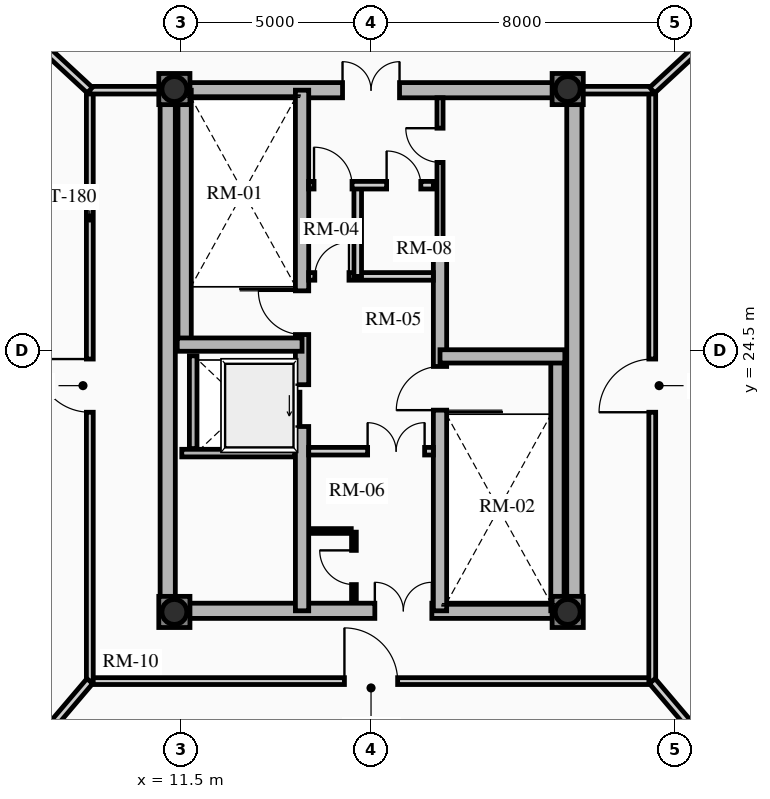
"""IFC4 building model, lengths in metres.
Left out: names, types, materials, properties, quantities, classifications, styles, units other than length and angle.
Written with IfcOpenShell. Run it as: python <this file> out.ifc"""

import sys

from ifc_helpers import new_model, si_unit, direction, frame, frame_2d, origin, origin_2d, place, context, subcontext, project, spatial, rectangle, hollow_circle, extrude, source, transform, mapped, element, fill, save


model = new_model("IFC4")
c1 = context("Model", 3, precision=1e-05, world=origin(), true_north=direction((0.0, 1.0)))
c2 = subcontext(c1, "Body", "Model", "MODEL_VIEW")
j1 = project(units=[si_unit("LENGTHUNIT", "METRE"), si_unit("PLANEANGLEUNIT", "RADIAN")], contexts=[c1])
p1 = place(None, origin())
s1 = spatial("IfcSite", under=j1, at=p1, CompositionType="ELEMENT")
p2 = place(p1, origin())
s2 = spatial("IfcBuilding", under=s1, at=p2, CompositionType="ELEMENT")
p3 = place(p2, frame((0.0, 0.0, 240.33)))
s3 = spatial("IfcBuildingStorey", under=s2, at=p3, CompositionType="ELEMENT", Elevation=240.33)
for number, where, z_axis, x_axis in (
    (1, (11.15, 17.45, 0.0), (0.0, 0.0, 1.0), (0.0, 1.0, 0.0)),
    (2, (21.85, 17.45, 0.0), (0.0, 0.0, 1.0), (0.0, 1.0, 0.0)),
):
    element("IfcWall", number, at=place(p3, frame(where, z_axis=z_axis, x_axis=x_axis)), inside=s3, PredefinedType="SHEAR", context=c2, shape_type="SweptSolid", body=[
        extrude(rectangle(XDim=14.1, YDim=0.4, at=frame_2d((7.05, 0.0))), origin(), (0.0, 0.0, 1.0), 4.5),
    ])
p4 = place(p3, frame((11.15, 17.65, 0.0), z_axis=(0.0, 0.0, 1.0), x_axis=(1.0, 0.0, 0.0)))
e3 = element("IfcWall", 3, at=p4, inside=s3, PredefinedType="SHEAR", context=c2, shape_type="SweptSolid", body=[
    extrude(rectangle(XDim=10.7, YDim=0.4, at=frame_2d((5.35, 0.0))), origin(), (0.0, 0.0, 1.0), 4.5),
])
m1 = source(origin(), c2, "Body", "SweptSolid", [
    extrude(rectangle(XDim=1.5, YDim=2.02, at=frame_2d((0.75, 1.01))), frame((0.0, 0.21, 0.0), z_axis=(0.0, -1.0, 0.0), x_axis=(1.0, 0.0, 0.0)), (0.0, 0.0, 1.0), 0.42),
])
p5 = place(p4, frame((5.45, 0.0, 0.0)))
e4 = element("IfcOpeningElement", 4, at=p5, cuts=e3, PredefinedType="OPENING", context=c2, shape_type="MappedRepresentation", body=[
    mapped(m1, transform((0.0, 0.0, 0.0), x_axis=(1.0, 0.0, 0.0), y_axis=(0.0, 1.0, 0.0), z_axis=(0.0, 0.0, 1.0), scale=1.0)),
])
p6 = place(p3, frame((11.15, 31.35, 0.0), z_axis=(0.0, 0.0, 1.0), x_axis=(1.0, 0.0, 0.0)))
e5 = element("IfcWall", 5, at=p6, inside=s3, PredefinedType="SHEAR", context=c2, shape_type="SweptSolid", body=[
    extrude(rectangle(XDim=10.7, YDim=0.4, at=frame_2d((5.35, 0.0))), origin(), (0.0, 0.0, 1.0), 4.5),
])
p7 = place(p6, frame((4.6, 0.0, 0.0)))
e6 = element("IfcOpeningElement", 6, at=p7, cuts=e5, PredefinedType="OPENING", context=c2, shape_type="MappedRepresentation", body=[
    mapped(m1, transform((0.0, 0.0, 0.0), x_axis=(1.0, 0.0, 0.0), y_axis=(0.0, 1.0, 0.0), z_axis=(0.0, 0.0, 1.0), scale=1.0)),
])
p8 = place(p3, frame((14.685, 17.65, 0.0), z_axis=(0.0, 0.0, 1.0), x_axis=(0.0, 1.0, 0.0)))
e7 = element("IfcWall", 7, at=p8, inside=s3, PredefinedType="SHEAR", context=c2, shape_type="SweptSolid", body=[
    extrude(rectangle(XDim=13.7, YDim=0.35, at=frame_2d((6.85, 0.0))), origin(), (0.0, 0.0, 1.0), 4.5),
])
m2 = source(origin(), c2, "Body", "SweptSolid", [
    extrude(rectangle(XDim=1.1, YDim=2.015, at=frame_2d((0.55, 1.007))), frame((0.0, 0.185, 0.0), z_axis=(0.0, -1.0, 0.0), x_axis=(1.0, 0.0, 0.0)), (0.0, 0.0, 1.0), 0.37),
])
p9 = place(p8, frame((4.85, 0.0, 0.0)))
e8 = element("IfcOpeningElement", 8, at=p9, cuts=e7, PredefinedType="OPENING", context=c2, shape_type="MappedRepresentation", body=[
    mapped(m2, transform((0.0, 0.0, 0.0), x_axis=(1.0, 0.0, 0.0), y_axis=(0.0, 1.0, 0.0), z_axis=(0.0, 0.0, 1.0), scale=1.0)),
])
m3 = source(origin(), c2, "Body", "SweptSolid", [
    extrude(rectangle(XDim=1.15, YDim=2.02, at=frame_2d((0.575, 1.01))), frame((0.0, 0.185, 0.0), z_axis=(0.0, -1.0, 0.0), x_axis=(1.0, 0.0, 0.0)), (0.0, 0.0, 1.0), 0.37),
])
p10 = place(p8, frame((7.27, 0.0, 0.0)))
e9 = element("IfcOpeningElement", 9, at=p10, cuts=e7, PredefinedType="OPENING", context=c2, shape_type="MappedRepresentation", body=[
    mapped(m3, transform((0.0, 0.0, 0.0), x_axis=(1.0, 0.0, 0.0), y_axis=(0.0, 1.0, 0.0), z_axis=(0.0, 0.0, 1.0), scale=1.0)),
])
p11 = place(p3, frame((18.315, 17.65, 0.0), z_axis=(0.0, 0.0, 1.0), x_axis=(0.0, 1.0, 0.0)))
e10 = element("IfcWall", 10, at=p11, inside=s3, PredefinedType="SHEAR", context=c2, shape_type="SweptSolid", body=[
    extrude(rectangle(XDim=9.6, YDim=0.35, at=frame_2d((4.8, 0.0))), origin(), (0.0, 0.0, 1.0), 4.5),
])
p12 = place(p11, frame((5.28, 0.0, 0.0)))
e11 = element("IfcOpeningElement", 11, at=p12, cuts=e10, PredefinedType="OPENING", context=c2, shape_type="MappedRepresentation", body=[
    mapped(m3, transform((0.0, 0.0, 0.0), x_axis=(1.0, 0.0, 0.0), y_axis=(0.0, 1.0, 0.0), z_axis=(0.0, 0.0, 1.0), scale=1.0)),
])
p13 = place(p3, frame((11.595, 24.655, 0.0), z_axis=(0.0, 0.0, 1.0), x_axis=(0.0, 1.0, 0.0)))
e12 = element("IfcWall", 12, at=p13, inside=s3, PredefinedType="SHEAR", context=c2, shape_type="SweptSolid", body=[
    extrude(rectangle(XDim=6.695, YDim=0.35, at=frame_2d((3.348, 0.0))), origin(), (0.0, 0.0, 1.0), 4.5),
])
p14 = place(p3, frame((11.4, 24.655, 0.0), z_axis=(0.0, 0.0, 1.0), x_axis=(1.0, 0.0, 0.0)))
e13 = element("IfcWall", 13, at=p14, inside=s3, PredefinedType="SHEAR", context=c2, shape_type="SweptSolid", body=[
    extrude(rectangle(XDim=3.285, YDim=0.35, at=frame_2d((1.643, 0.0))), origin(), (0.0, 0.0, 1.0), 4.5),
])
p15 = place(p3, frame((21.405, 17.65, 0.0), z_axis=(0.0, 0.0, 1.0), x_axis=(0.0, 1.0, 0.0)))
e14 = element("IfcWall", 14, at=p15, inside=s3, PredefinedType="SHEAR", context=c2, shape_type="SweptSolid", body=[
    extrude(rectangle(XDim=6.695, YDim=0.35, at=frame_2d((3.348, 0.0))), origin(), (0.0, 0.0, 1.0), 4.5),
])
p16 = place(p3, frame((18.315, 24.345, 0.0), z_axis=(0.0, 0.0, 1.0), x_axis=(1.0, 0.0, 0.0)))
e15 = element("IfcWall", 15, at=p16, inside=s3, PredefinedType="SHEAR", context=c2, shape_type="SweptSolid", body=[
    extrude(rectangle(XDim=3.285, YDim=0.35, at=frame_2d((1.643, 0.0))), origin(), (0.0, 0.0, 1.0), 4.5),
])
for number, where, z_axis, x_axis in (
    (16, (11.325, 17.62, 0.0), (0.0, 0.0, 1.0), (1.0, 0.0, 0.0)),
    (17, (11.325, 31.38, 0.0), (0.0, 0.0, 1.0), (1.0, 0.0, 0.0)),
    (18, (21.675, 17.62, 0.0), (0.0, 0.0, 1.0), (1.0, 0.0, 0.0)),
    (19, (21.675, 31.38, 0.0), (0.0, 0.0, 1.0), (1.0, 0.0, 0.0)),
):
    element("IfcColumn", number, at=place(p3, frame(where, z_axis=z_axis, x_axis=x_axis)), inside=s3, PredefinedType="COLUMN", context=c2, shape_type="SweptSolid", body=[
        extrude(hollow_circle(Radius=0.33, WallThickness=0.025, at=origin_2d()), origin(), (0.0, 0.0, 1.0), 4.5),
    ])
p17 = place(p3, frame((26.718, 15.407, 0.0), z_axis=(0.0, 0.0, 1.0), x_axis=(-0.632467166636, -0.774587169483, 0.0)))
e20 = element("IfcWall", 20, at=p17, inside=s3, PredefinedType="SOLIDWALL", context=c2, shape_type="SweptSolid", body=[
    extrude(rectangle(XDim=4.418, YDim=0.22, at=frame_2d((2.209, 0.0))), origin(), (0.0, 0.0, 1.0), 3.556),
])
p18 = place(p3, frame((11.52, 21.8, 0.0), z_axis=(0.0, 0.0, 1.0), x_axis=(1.0, 0.0, 0.0)))
e21 = element("IfcWall", 21, at=p18, inside=s3, PredefinedType="SHEAR", context=c2, shape_type="SweptSolid", body=[
    extrude(rectangle(XDim=2.97, YDim=0.2, at=frame_2d((1.485, 0.0))), origin(), (0.0, 0.0, 1.0), 4.5),
])
p19 = place(p3, frame((11.82, 21.92, 0.0), z_axis=(0.0, 0.0, 1.0), x_axis=(0.0, 1.0, 0.0)))
e22 = element("IfcWall", 22, at=p19, inside=s3, PredefinedType="SHEAR", context=c2, shape_type="SweptSolid", body=[
    extrude(rectangle(XDim=2.44, YDim=0.2, at=frame_2d((1.22, 0.0))), origin(), (0.0, 0.0, 1.0), 4.5),
])
p20 = place(p3, frame((14.86, 21.85, 0.0), z_axis=(0.0, 0.0, 1.0), x_axis=(1.0, 0.0, 0.0)))
e23 = element("IfcWall", 23, at=p20, inside=s3, PredefinedType="PARTITIONING", context=c2, shape_type="SweptSolid", body=[
    extrude(rectangle(XDim=3.28, YDim=0.2, at=frame_2d((1.64, 0.0))), origin(), (0.0, 0.0, 1.0), 4.185),
])
m4 = source(origin(), c2, "Body", "SweptSolid", [
    extrude(rectangle(XDim=1.5, YDim=2.02, at=frame_2d((0.75, 1.01))), frame((0.0, 0.11, 0.0), z_axis=(0.0, -1.0, 0.0), x_axis=(1.0, 0.0, 0.0)), (0.0, 0.0, 1.0), 0.22),
])
p21 = place(p20, frame((1.55, 0.0, 0.0)))
e24 = element("IfcOpeningElement", 24, at=p21, cuts=e23, PredefinedType="OPENING", context=c2, shape_type="MappedRepresentation", body=[
    mapped(m4, transform((0.0, 0.0, 0.0), x_axis=(1.0, 0.0, 0.0), y_axis=(0.0, 1.0, 0.0), z_axis=(0.0, 0.0, 1.0), scale=1.0)),
])
p22 = place(p3, frame((14.86, 26.45, 0.0), z_axis=(0.0, 0.0, 1.0), x_axis=(1.0, 0.0, 0.0)))
e25 = element("IfcWall", 25, at=p22, inside=s3, PredefinedType="PARTITIONING", context=c2, shape_type="SweptSolid", body=[
    extrude(rectangle(XDim=3.28, YDim=0.2, at=frame_2d((1.64, 0.0))), origin(), (0.0, 0.0, 1.0), 4.185),
])
m5 = source(origin(), c2, "Body", "SweptSolid", [
    extrude(rectangle(XDim=0.9, YDim=2.005, at=frame_2d((0.45, 1.002))), frame((0.0, 0.11, 0.0), z_axis=(0.0, -1.0, 0.0), x_axis=(1.0, 0.0, 0.0)), (0.0, 0.0, 1.0), 0.22),
])
p23 = place(p22, frame((0.16, 0.0, 0.0)))
e26 = element("IfcOpeningElement", 26, at=p23, cuts=e25, PredefinedType="OPENING", context=c2, shape_type="MappedRepresentation", body=[
    mapped(m5, transform((0.0, 0.0, 0.0), x_axis=(1.0, 0.0, 0.0), y_axis=(0.0, 1.0, 0.0), z_axis=(0.0, 0.0, 1.0), scale=1.0)),
])
p24 = place(p3, frame((16.15, 26.45, 0.0), z_axis=(0.0, 0.0, 1.0), x_axis=(0.0, 1.0, 0.0)))
e27 = element("IfcWall", 27, at=p24, inside=s3, PredefinedType="PARTITIONING", context=c2, shape_type="SweptSolid", body=[
    extrude(rectangle(XDim=2.4, YDim=0.2, at=frame_2d((1.2, 0.0))), origin(), (0.0, 0.0, 1.0), 4.185),
])
p25 = place(p3, frame((14.86, 28.85, 0.0), z_axis=(0.0, 0.0, 1.0), x_axis=(1.0, 0.0, 0.0)))
e28 = element("IfcWall", 28, at=p25, inside=s3, PredefinedType="PARTITIONING", context=c2, shape_type="SweptSolid", body=[
    extrude(rectangle(XDim=3.28, YDim=0.2, at=frame_2d((1.64, 0.0))), origin(), (0.0, 0.0, 1.0), 4.185),
])
m6 = source(origin(), c2, "Body", "SweptSolid", [
    extrude(rectangle(XDim=1.0, YDim=2.015, at=frame_2d((0.5, 1.007))), frame((0.0, 0.11, 0.0), z_axis=(0.0, -1.0, 0.0), x_axis=(1.0, 0.0, 0.0)), (0.0, 0.0, 1.0), 0.22),
])
p26 = place(p25, frame((0.14, 0.0, 0.0)))
e29 = element("IfcOpeningElement", 29, at=p26, cuts=e28, PredefinedType="OPENING", context=c2, shape_type="MappedRepresentation", body=[
    mapped(m6, transform((0.0, 0.0, 0.0), x_axis=(1.0, 0.0, 0.0), y_axis=(0.0, 1.0, 0.0), z_axis=(0.0, 0.0, 1.0), scale=1.0)),
])
p27 = place(p25, frame((2.05, 0.0, 0.0)))
e30 = element("IfcOpeningElement", 30, at=p27, cuts=e28, PredefinedType="OPENING", context=c2, shape_type="MappedRepresentation", body=[
    mapped(m5, transform((0.0, 0.0, 0.0), x_axis=(1.0, 0.0, 0.0), y_axis=(0.0, 1.0, 0.0), z_axis=(0.0, 0.0, 1.0), scale=1.0)),
])
p28 = place(p3, frame((16.05, 17.92, 0.0), z_axis=(0.0, 0.0, 1.0), x_axis=(0.0, 1.0, 0.0)))
e31 = element("IfcWall", 31, at=p28, inside=s3, PredefinedType="PARTITIONING", context=c2, shape_type="SweptSolid", body=[
    extrude(rectangle(XDim=1.8, YDim=0.125, at=frame_2d((0.9, 0.0))), origin(), (0.0, 0.0, 1.0), 4.185),
])
m7 = source(origin(), c2, "Body", "SweptSolid", [
    extrude(rectangle(XDim=0.9, YDim=2.005, at=frame_2d((0.45, 1.002))), frame((0.0, 0.073, 0.0), z_axis=(0.0, -1.0, 0.0), x_axis=(1.0, 0.0, 0.0)), (0.0, 0.0, 1.0), 0.145),
])
p29 = place(p28, frame((0.42, 0.0, 0.0)))
e32 = element("IfcOpeningElement", 32, at=p29, cuts=e31, PredefinedType="OPENING", context=c2, shape_type="MappedRepresentation", body=[
    mapped(m7, transform((0.0, 0.0, 0.0), x_axis=(1.0, 0.0, 0.0), y_axis=(0.0, 1.0, 0.0), z_axis=(0.0, 0.0, 1.0), scale=1.0)),
])
p30 = place(p3, frame((14.88, 19.75, 0.0), z_axis=(0.0, 0.0, 1.0), x_axis=(1.0, 0.0, 0.0)))
e33 = element("IfcWall", 33, at=p30, inside=s3, PredefinedType="PARTITIONING", context=c2, shape_type="SweptSolid", body=[
    extrude(rectangle(XDim=1.1, YDim=0.125, at=frame_2d((0.55, 0.0))), origin(), (0.0, 0.0, 1.0), 4.185),
])
p31 = place(p3, frame((18.315, 27.25, 0.0), z_axis=(0.0, 0.0, 1.0), x_axis=(0.0, 1.0, 0.0)))
e34 = element("IfcWall", 34, at=p31, inside=s3, PredefinedType="PARTITIONING", context=c2, shape_type="SweptSolid", body=[
    extrude(rectangle(XDim=3.9, YDim=0.16, at=frame_2d((1.95, 0.0))), origin(), (0.0, 0.0, 1.0), 4.185),
])
m8 = source(origin(), c2, "Body", "SweptSolid", [
    extrude(rectangle(XDim=0.9, YDim=2.005, at=frame_2d((0.45, 1.002))), frame((0.0, 0.09, 0.0), z_axis=(0.0, -1.0, 0.0), x_axis=(1.0, 0.0, 0.0)), (0.0, 0.0, 1.0), 0.18),
])
p32 = place(p31, frame((2.2, 0.0, 0.0)))
e35 = element("IfcOpeningElement", 35, at=p32, cuts=e34, PredefinedType="OPENING", context=c2, shape_type="MappedRepresentation", body=[
    mapped(m8, transform((0.0, 0.0, 0.0), x_axis=(1.0, 0.0, 0.0), y_axis=(0.0, 1.0, 0.0), z_axis=(0.0, 0.0, 1.0), scale=1.0)),
])
p33 = place(p3, frame((9.1, 15.8, 0.0), z_axis=(0.0, 0.0, 1.0), x_axis=(1.0, 0.0, 0.0)))
e36 = element("IfcWall", 36, at=p33, inside=s3, PredefinedType="PARTITIONING", context=c2, shape_type="SweptSolid", body=[
    extrude(rectangle(XDim=14.8, YDim=0.18, at=frame_2d((7.4, 0.0))), origin(), (0.0, 0.0, 1.0), 3.476),
])
m9 = source(origin(), c2, "Body", "SweptSolid", [
    extrude(rectangle(XDim=1.4, YDim=2.02, at=frame_2d((0.7, 1.01))), frame((0.0, 0.1, 0.0), z_axis=(0.0, -1.0, 0.0), x_axis=(1.0, 0.0, 0.0)), (0.0, 0.0, 1.0), 0.2),
])
p34 = place(p33, frame((6.7, 0.0, 0.0)))
e37 = element("IfcOpeningElement", 37, at=p34, cuts=e36, PredefinedType="OPENING", context=c2, shape_type="MappedRepresentation", body=[
    mapped(m9, transform((0.0, 0.0, 0.0), x_axis=(1.0, 0.0, 0.0), y_axis=(0.0, 1.0, 0.0), z_axis=(0.0, 0.0, 1.0), scale=1.0)),
])
p35 = place(p3, frame((9.1, 15.8, 0.0), z_axis=(0.0, 0.0, 1.0), x_axis=(0.0, 1.0, 0.0)))
e38 = element("IfcWall", 38, at=p35, inside=s3, PredefinedType="PARTITIONING", context=c2, shape_type="SweptSolid", body=[
    extrude(rectangle(XDim=15.55, YDim=0.18, at=frame_2d((7.775, 0.0))), origin(), (0.0, 0.0, 1.0), 3.476),
])
p36 = place(p35, frame((7.075, 0.0, 0.0)))
e39 = element("IfcOpeningElement", 39, at=p36, cuts=e38, PredefinedType="OPENING", context=c2, shape_type="MappedRepresentation", body=[
    mapped(m9, transform((0.0, 0.0, 0.0), x_axis=(1.0, 0.0, 0.0), y_axis=(0.0, 1.0, 0.0), z_axis=(0.0, 0.0, 1.0), scale=1.0)),
])
p37 = place(p3, frame((23.9, 15.8, 0.0), z_axis=(0.0, 0.0, 1.0), x_axis=(0.0, 1.0, 0.0)))
e40 = element("IfcWall", 40, at=p37, inside=s3, PredefinedType="PARTITIONING", context=c2, shape_type="SweptSolid", body=[
    extrude(rectangle(XDim=15.55, YDim=0.18, at=frame_2d((7.775, 0.0))), origin(), (0.0, 0.0, 1.0), 3.476),
])
p38 = place(p37, frame((7.075, 0.0, 0.0)))
e41 = element("IfcOpeningElement", 41, at=p38, cuts=e40, PredefinedType="OPENING", context=c2, shape_type="MappedRepresentation", body=[
    mapped(m9, transform((0.0, 0.0, 0.0), x_axis=(1.0, 0.0, 0.0), y_axis=(0.0, 1.0, 0.0), z_axis=(0.0, 0.0, 1.0), scale=1.0)),
])
for number, where, z_axis, x_axis in (
    (42, (9.1, 31.35, 0.0), (0.0, 0.0, 1.0), (1.0, 0.0, 0.0)),
    (43, (22.05, 31.35, 0.0), (0.0, 0.0, 1.0), (1.0, 0.0, 0.0)),
):
    element("IfcWall", number, at=place(p3, frame(where, z_axis=z_axis, x_axis=x_axis)), inside=s3, PredefinedType="PARTITIONING", context=c2, shape_type="SweptSolid", body=[
        extrude(rectangle(XDim=1.85, YDim=0.2, at=frame_2d((0.925, 0.0))), origin(), (0.0, 0.0, 1.0), 3.476),
    ])
for number, where, z_axis, x_axis in (
    (44, (9.1, 31.35, 0.0), (0.0, 0.0, 1.0), (-0.734, 0.679, 0.0)),
    (45, (23.9, 31.35, 0.0), (0.0, 0.0, 1.0), (0.734, 0.679, 0.0)),
):
    element("IfcWall", number, at=place(p3, frame(where, z_axis=z_axis, x_axis=x_axis)), inside=s3, PredefinedType="PARTITIONING", context=c2, shape_type="SweptSolid", body=[
        extrude(rectangle(XDim=3.409, YDim=0.2, at=frame_2d((1.704, 0.0))), origin(), (0.0, 0.0, 1.0), 3.476),
    ])
for number, where, z_axis, x_axis in (
    (46, (23.9, 15.8, 0.0), (0.0, 0.0, 1.0), (0.648, -0.762, 0.0)),
    (47, (9.1, 15.8, 0.0), (0.0, 0.0, 1.0), (-0.648, -0.762, 0.0)),
):
    element("IfcWall", number, at=place(p3, frame(where, z_axis=z_axis, x_axis=x_axis)), inside=s3, PredefinedType="PARTITIONING", context=c2, shape_type="SweptSolid", body=[
        extrude(rectangle(XDim=2.272, YDim=0.2, at=frame_2d((1.136, 0.0))), origin(), (0.0, 0.0, 1.0), 3.556),
    ])
m10 = source(origin(), c2, "Body", "SweptSolid", [
    extrude(rectangle(XDim=1.1, YDim=2.015, at=frame_2d((0.55, 1.007))), frame((0.0, 0.025, 0.0), z_axis=(0.0, -1.0, 0.0), x_axis=(1.0, 0.0, 0.0)), (0.0, 0.0, 1.0), 0.05),
])
p39 = place(p9, origin())
e48 = element("IfcDoor", 48, at=p39, inside=s3, OperationType="SLIDING_TO_LEFT", PredefinedType="DOOR", context=c2, shape_type="MappedRepresentation", body=[
    mapped(m10, transform((0.0, 0.0, 0.0), x_axis=(1.0, 0.0, 0.0), y_axis=(0.0, 1.0, 0.0), z_axis=(0.0, 0.0, 1.0), scale=1.0)),
])
fill(e8, e48)
m11 = source(origin(), c2, "Body", "SweptSolid", [
    extrude(rectangle(XDim=1.15, YDim=2.02, at=frame_2d((0.575, 1.01))), frame((0.0, 0.025, 0.0), z_axis=(0.0, -1.0, 0.0), x_axis=(1.0, 0.0, 0.0)), (0.0, 0.0, 1.0), 0.05),
])
p40 = place(p10, origin())
e49 = element("IfcDoor", 49, at=p40, inside=s3, OperationType="SINGLE_SWING_RIGHT", PredefinedType="DOOR", context=c2, shape_type="MappedRepresentation", body=[
    mapped(m11, transform((0.0, 0.0, 0.0), x_axis=(1.0, 0.0, 0.0), y_axis=(0.0, 1.0, 0.0), z_axis=(0.0, 0.0, 1.0), scale=1.0)),
])
fill(e9, e49)
p41 = place(p12, origin())
e50 = element("IfcDoor", 50, at=p41, inside=s3, OperationType="SINGLE_SWING_LEFT", PredefinedType="DOOR", context=c2, shape_type="MappedRepresentation", body=[
    mapped(m11, transform((0.0, 0.0, 0.0), x_axis=(1.0, 0.0, 0.0), y_axis=(0.0, 1.0, 0.0), z_axis=(0.0, 0.0, 1.0), scale=1.0)),
])
fill(e11, e50)
m12 = source(origin(), c2, "Body", "SweptSolid", [
    extrude(rectangle(XDim=1.5, YDim=2.02, at=frame_2d((0.75, 1.01))), frame((0.0, 0.025, 0.0), z_axis=(0.0, -1.0, 0.0), x_axis=(1.0, 0.0, 0.0)), (0.0, 0.0, 1.0), 0.05),
])
p42 = place(p7, origin())
e51 = element("IfcDoor", 51, at=p42, inside=s3, OperationType="DOUBLE_DOOR_SINGLE_SWING", PredefinedType="DOOR", context=c2, shape_type="MappedRepresentation", body=[
    mapped(m12, transform((0.0, 0.0, 0.0), x_axis=(1.0, 0.0, 0.0), y_axis=(0.0, 1.0, 0.0), z_axis=(0.0, 0.0, 1.0), scale=1.0)),
])
fill(e6, e51)
p43 = place(p5, origin())
e52 = element("IfcDoor", 52, at=p43, inside=s3, OperationType="DOUBLE_DOOR_SINGLE_SWING", PredefinedType="DOOR", context=c2, shape_type="MappedRepresentation", body=[
    mapped(m12, transform((0.0, 0.0, 0.0), x_axis=(1.0, 0.0, 0.0), y_axis=(0.0, 1.0, 0.0), z_axis=(0.0, 0.0, 1.0), scale=1.0)),
])
fill(e4, e52)
p44 = place(p21, origin())
e53 = element("IfcDoor", 53, at=p44, inside=s3, OperationType="DOUBLE_DOOR_SINGLE_SWING", PredefinedType="DOOR", context=c2, shape_type="MappedRepresentation", body=[
    mapped(m12, transform((0.0, 0.0, 0.0), x_axis=(1.0, 0.0, 0.0), y_axis=(0.0, 1.0, 0.0), z_axis=(0.0, 0.0, 1.0), scale=1.0)),
])
fill(e24, e53)
m13 = source(origin(), c2, "Body", "SweptSolid", [
    extrude(rectangle(XDim=0.9, YDim=2.005, at=frame_2d((0.45, 1.002))), frame((0.0, 0.025, 0.0), z_axis=(0.0, -1.0, 0.0), x_axis=(1.0, 0.0, 0.0)), (0.0, 0.0, 1.0), 0.05),
])
p45 = place(p23, origin())
e54 = element("IfcDoor", 54, at=p45, inside=s3, OperationType="SINGLE_SWING_RIGHT", PredefinedType="DOOR", context=c2, shape_type="MappedRepresentation", body=[
    mapped(m13, transform((0.0, 0.0, 0.0), x_axis=(1.0, 0.0, 0.0), y_axis=(0.0, 1.0, 0.0), z_axis=(0.0, 0.0, 1.0), scale=1.0)),
])
fill(e26, e54)
m14 = source(origin(), c2, "Body", "SweptSolid", [
    extrude(rectangle(XDim=1.0, YDim=2.015, at=frame_2d((0.5, 1.007))), frame((0.0, 0.025, 0.0), z_axis=(0.0, -1.0, 0.0), x_axis=(1.0, 0.0, 0.0)), (0.0, 0.0, 1.0), 0.05),
])
p46 = place(p26, origin())
e55 = element("IfcDoor", 55, at=p46, inside=s3, OperationType="SINGLE_SWING_LEFT", PredefinedType="DOOR", context=c2, shape_type="MappedRepresentation", body=[
    mapped(m14, transform((0.0, 0.0, 0.0), x_axis=(1.0, 0.0, 0.0), y_axis=(0.0, 1.0, 0.0), z_axis=(0.0, 0.0, 1.0), scale=1.0)),
])
fill(e29, e55)
p47 = place(p29, origin())
e56 = element("IfcDoor", 56, at=p47, inside=s3, OperationType="SINGLE_SWING_RIGHT", PredefinedType="DOOR", context=c2, shape_type="MappedRepresentation", body=[
    mapped(m13, transform((0.0, 0.0, 0.0), x_axis=(1.0, 0.0, 0.0), y_axis=(0.0, 1.0, 0.0), z_axis=(0.0, 0.0, 1.0), scale=1.0)),
])
fill(e32, e56)
p48 = place(p27, origin())
e57 = element("IfcDoor", 57, at=p48, inside=s3, OperationType="SINGLE_SWING_LEFT", PredefinedType="DOOR", context=c2, shape_type="MappedRepresentation", body=[
    mapped(m13, transform((0.0, 0.0, 0.0), x_axis=(1.0, 0.0, 0.0), y_axis=(0.0, 1.0, 0.0), z_axis=(0.0, 0.0, 1.0), scale=1.0)),
])
fill(e30, e57)
p49 = place(p32, origin())
e58 = element("IfcDoor", 58, at=p49, inside=s3, OperationType="SINGLE_SWING_RIGHT", PredefinedType="DOOR", context=c2, shape_type="MappedRepresentation", body=[
    mapped(m13, transform((0.0, 0.0, 0.0), x_axis=(1.0, 0.0, 0.0), y_axis=(0.0, 1.0, 0.0), z_axis=(0.0, 0.0, 1.0), scale=1.0)),
])
fill(e35, e58)
m15 = source(origin(), c2, "Body", "SweptSolid", [
    extrude(rectangle(XDim=1.4, YDim=2.02, at=frame_2d((0.7, 1.01))), frame((0.0, 0.025, 0.0), z_axis=(0.0, -1.0, 0.0), x_axis=(1.0, 0.0, 0.0)), (0.0, 0.0, 1.0), 0.05),
])
p50 = place(p34, origin())
e59 = element("IfcDoor", 59, at=p50, inside=s3, OperationType="SINGLE_SWING_LEFT", PredefinedType="DOOR", context=c2, shape_type="MappedRepresentation", body=[
    mapped(m15, transform((0.0, 0.0, 0.0), x_axis=(1.0, 0.0, 0.0), y_axis=(0.0, 1.0, 0.0), z_axis=(0.0, 0.0, 1.0), scale=1.0)),
])
fill(e37, e59)
p51 = place(p36, origin())
e60 = element("IfcDoor", 60, at=p51, inside=s3, OperationType="SINGLE_SWING_RIGHT", PredefinedType="DOOR", context=c2, shape_type="MappedRepresentation", body=[
    mapped(m15, transform((0.0, 0.0, 0.0), x_axis=(1.0, 0.0, 0.0), y_axis=(0.0, 1.0, 0.0), z_axis=(0.0, 0.0, 1.0), scale=1.0)),
])
fill(e39, e60)
p52 = place(p38, origin())
e61 = element("IfcDoor", 61, at=p52, inside=s3, OperationType="SINGLE_SWING_LEFT", PredefinedType="DOOR", context=c2, shape_type="MappedRepresentation", body=[
    mapped(m15, transform((0.0, 0.0, 0.0), x_axis=(1.0, 0.0, 0.0), y_axis=(0.0, 1.0, 0.0), z_axis=(0.0, 0.0, 1.0), scale=1.0)),
])
fill(e41, e61)
save(model, sys.argv[1])
